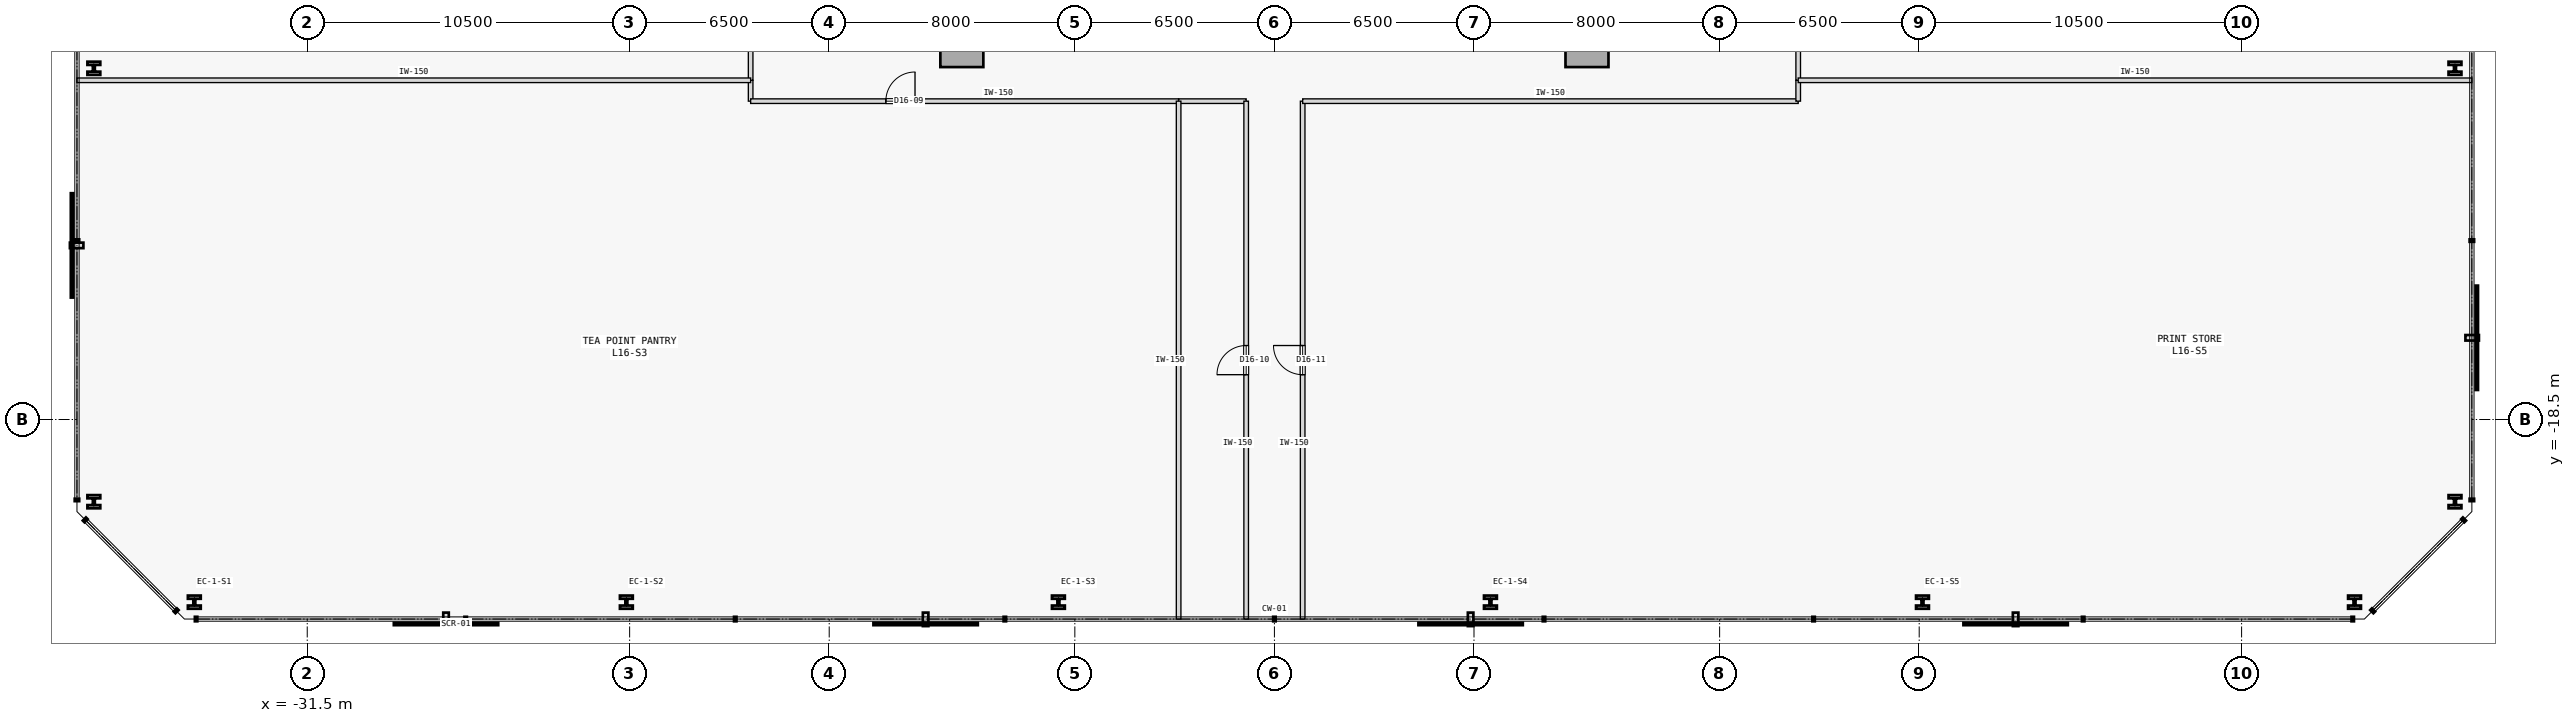
"""IFC4 building model, lengths in metres.
Left out: names, types, materials, properties, quantities, classifications, styles, units other than length and angle.
Written with IfcOpenShell. Run it as: python <this file> out.ifc"""

import sys

from ifc_helpers import new_model, si_unit, direction, frame, frame_2d, origin, origin_2d, place, context, subcontext, project, spatial, rectangle, i_section, extrude, element, fill, save


model = new_model("IFC4")
c1 = context("Model", 3, precision=1e-05, world=origin(), true_north=direction((0.0, 1.0)))
c2 = subcontext(c1, "Body", "Model", "MODEL_VIEW")
j1 = project(units=[si_unit("LENGTHUNIT", "METRE"), si_unit("PLANEANGLEUNIT", "RADIAN")], contexts=[c1])
p1 = place(None, origin())
s1 = spatial("IfcSite", under=j1, at=p1, CompositionType="ELEMENT")
p2 = place(p1, origin())
s2 = spatial("IfcBuilding", under=s1, at=p2, CompositionType="ELEMENT")
p3 = place(p2, frame((0.0, 0.0, 67.4)))
s3 = spatial("IfcBuildingStorey", under=s2, at=p3, CompositionType="ELEMENT", Elevation=67.4)
for number, where, z_axis, x_axis in (
    (1, (-10.18, -6.32, 0.0), (0.0, 0.0, 1.0), (1.0, 0.0, 0.0)),
    (2, (10.18, -6.32, 0.0), (0.0, 0.0, 1.0), (1.0, 0.0, 0.0)),
):
    element("IfcColumn", number, at=place(p3, frame(where, z_axis=z_axis, x_axis=x_axis)), inside=s3, PredefinedType="COLUMN", context=c2, shape_type="SweptSolid", body=[
        extrude(rectangle(XDim=1.4, YDim=1.4, at=origin_2d()), origin(), (0.0, 0.0, 1.0), 3.8),
    ])
for number, where, z_axis, x_axis in (
    (3, (-35.178, -24.45, 0.0), (0.0, 0.0, 1.0), (1.0, 0.0, 0.0)),
    (4, (-21.107, -24.45, 0.0), (0.0, 0.0, 1.0), (1.0, 0.0, 0.0)),
    (5, (-7.036, -24.45, 0.0), (0.0, 0.0, 1.0), (1.0, 0.0, 0.0)),
    (6, (7.036, -24.45, 0.0), (0.0, 0.0, 1.0), (1.0, 0.0, 0.0)),
    (7, (21.107, -24.45, 0.0), (0.0, 0.0, 1.0), (1.0, 0.0, 0.0)),
    (8, (35.178, -24.45, 0.0), (0.0, 0.0, 1.0), (1.0, 0.0, 0.0)),
    (9, (38.45, -21.178, 0.0), (0.0, 0.0, 1.0), (1.0, 0.0, 0.0)),
    (10, (38.45, -7.059, 0.0), (0.0, 0.0, 1.0), (1.0, 0.0, 0.0)),
    (11, (-38.45, -7.059, 0.0), (0.0, 0.0, 1.0), (1.0, 0.0, 0.0)),
    (12, (-38.45, -21.178, 0.0), (0.0, 0.0, 1.0), (1.0, 0.0, 0.0)),
):
    element("IfcColumn", number, at=place(p3, frame(where, z_axis=z_axis, x_axis=x_axis)), inside=s3, PredefinedType="COLUMN", context=c2, shape_type="SweptSolid", body=[
        extrude(i_section(OverallWidth=0.42, OverallDepth=0.431, WebThickness=0.065, FlangeThickness=0.106, FilletRadius=0.015, at=origin_2d()), origin(), (0.0, 0.0, 1.0), 3.8),
    ])
p4 = place(p3, frame((-17.059, -8.13, 0.0), z_axis=(0.0, 0.0, 1.0), x_axis=(0.0, 1.0, 0.0)))
e13 = element("IfcWall", 13, at=p4, inside=s3, PredefinedType="PARTITIONING", context=c2, shape_type="SweptSolid", body=[
    extrude(rectangle(XDim=0.68, YDim=0.15, at=frame_2d((0.34, 0.0))), origin(), (0.0, 0.0, 1.0), 3.575),
])
p5 = place(p3, frame((-17.059, -8.13, 0.0), z_axis=(0.0, 0.0, 1.0), x_axis=(1.0, 0.0, 0.0)))
e14 = element("IfcWall", 14, at=p5, inside=s3, PredefinedType="PARTITIONING", context=c2, shape_type="SweptSolid", body=[
    extrude(rectangle(XDim=13.939, YDim=0.15, at=frame_2d((6.969, 0.0))), origin(), (0.0, 0.0, 1.0), 3.575),
])
p6 = place(p5, frame((4.404, 0.0, 0.0)))
e15 = element("IfcOpeningElement", 15, at=p6, cuts=e14, PredefinedType="OPENING", context=c2, shape_type="SweptSolid", body=[
    extrude(rectangle(XDim=0.95, YDim=2.15, at=frame_2d((0.475, 1.075))), frame((0.0, 0.085, 0.0), z_axis=(0.0, -1.0, 0.0), x_axis=(1.0, 0.0, 0.0)), (0.0, 0.0, 1.0), 0.17),
])
p7 = place(p3, frame((-3.12, -8.13, 0.0), z_axis=(0.0, 0.0, 1.0), x_axis=(1.0, 0.0, 0.0)))
e16 = element("IfcWall", 16, at=p7, inside=s3, PredefinedType="PARTITIONING", context=c2, shape_type="SweptSolid", body=[
    extrude(rectangle(XDim=2.2, YDim=0.15, at=frame_2d((1.1, 0.0))), origin(), (0.0, 0.0, 1.0), 3.575),
])
p8 = place(p3, frame((-0.92, -25.0, 0.0), z_axis=(0.0, 0.0, 1.0), x_axis=(0.0, 1.0, 0.0)))
e17 = element("IfcWall", 17, at=p8, inside=s3, PredefinedType="PARTITIONING", context=c2, shape_type="SweptSolid", body=[
    extrude(rectangle(XDim=16.87, YDim=0.15, at=frame_2d((8.435, 0.0))), origin(), (0.0, 0.0, 1.0), 3.575),
])
p9 = place(p8, frame((7.96, 0.0, 0.0)))
e18 = element("IfcOpeningElement", 18, at=p9, cuts=e17, PredefinedType="OPENING", context=c2, shape_type="SweptSolid", body=[
    extrude(rectangle(XDim=0.95, YDim=2.15, at=frame_2d((0.475, 1.075))), frame((0.0, 0.085, 0.0), z_axis=(0.0, -1.0, 0.0), x_axis=(1.0, 0.0, 0.0)), (0.0, 0.0, 1.0), 0.17),
])
p10 = place(p3, frame((0.92, -25.0, 0.0), z_axis=(0.0, 0.0, 1.0), x_axis=(0.0, 1.0, 0.0)))
e19 = element("IfcWall", 19, at=p10, inside=s3, PredefinedType="PARTITIONING", context=c2, shape_type="SweptSolid", body=[
    extrude(rectangle(XDim=16.87, YDim=0.15, at=frame_2d((8.435, 0.0))), origin(), (0.0, 0.0, 1.0), 3.575),
])
p11 = place(p10, frame((7.96, 0.0, 0.0)))
e20 = element("IfcOpeningElement", 20, at=p11, cuts=e19, PredefinedType="OPENING", context=c2, shape_type="SweptSolid", body=[
    extrude(rectangle(XDim=0.95, YDim=2.15, at=frame_2d((0.475, 1.075))), frame((0.0, 0.085, 0.0), z_axis=(0.0, -1.0, 0.0), x_axis=(1.0, 0.0, 0.0)), (0.0, 0.0, 1.0), 0.17),
])
p12 = place(p3, frame((0.92, -8.13, 0.0), z_axis=(0.0, 0.0, 1.0), x_axis=(1.0, 0.0, 0.0)))
e21 = element("IfcWall", 21, at=p12, inside=s3, PredefinedType="PARTITIONING", context=c2, shape_type="SweptSolid", body=[
    extrude(rectangle(XDim=16.139, YDim=0.15, at=frame_2d((8.07, 0.0))), origin(), (0.0, 0.0, 1.0), 3.575),
])
p13 = place(p3, frame((17.059, -8.13, 0.0), z_axis=(0.0, 0.0, 1.0), x_axis=(0.0, 1.0, 0.0)))
e22 = element("IfcWall", 22, at=p13, inside=s3, PredefinedType="PARTITIONING", context=c2, shape_type="SweptSolid", body=[
    extrude(rectangle(XDim=0.68, YDim=0.15, at=frame_2d((0.34, 0.0))), origin(), (0.0, 0.0, 1.0), 3.575),
])
for number, where, z_axis, x_axis in (
    (23, (-17.059, -7.45, 0.0), (0.0, 0.0, 1.0), (0.0, 1.0, 0.0)),
    (24, (17.059, -7.45, 0.0), (0.0, 0.0, 1.0), (0.0, 1.0, 0.0)),
):
    element("IfcWall", number, at=place(p3, frame(where, z_axis=z_axis, x_axis=x_axis)), inside=s3, PredefinedType="PARTITIONING", context=c2, shape_type="SweptSolid", body=[
        extrude(rectangle(XDim=6.53, YDim=0.15, at=frame_2d((3.265, 0.0))), origin(), (0.0, 0.0, 1.0), 3.575),
    ])
p14 = place(p3, frame((-3.12, -25.0, 0.0), z_axis=(0.0, 0.0, 1.0), x_axis=(0.0, 1.0, 0.0)))
e25 = element("IfcWall", 25, at=p14, inside=s3, PredefinedType="PARTITIONING", context=c2, shape_type="SweptSolid", body=[
    extrude(rectangle(XDim=16.87, YDim=0.15, at=frame_2d((8.435, 0.0))), origin(), (0.0, 0.0, 1.0), 3.575),
])
for number, where, z_axis, x_axis in (
    (26, (-39.0, -7.45, 0.0), (0.0, 0.0, 1.0), (1.0, 0.0, 0.0)),
    (27, (17.059, -7.45, 0.0), (0.0, 0.0, 1.0), (1.0, 0.0, 0.0)),
):
    element("IfcWall", number, at=place(p3, frame(where, z_axis=z_axis, x_axis=x_axis)), inside=s3, PredefinedType="PARTITIONING", context=c2, shape_type="SweptSolid", body=[
        extrude(rectangle(XDim=21.941, YDim=0.15, at=frame_2d((10.97, 0.0))), origin(), (0.0, 0.0, 1.0), 3.575),
    ])
p15 = place(p6, origin())
e28 = element("IfcDoor", 28, at=p15, inside=s3, OperationType="SINGLE_SWING_RIGHT", PredefinedType="DOOR", context=c2, shape_type="SweptSolid", body=[
    extrude(rectangle(XDim=0.95, YDim=2.15, at=frame_2d((0.475, 1.075))), frame((0.0, 0.025, 0.0), z_axis=(0.0, -1.0, 0.0), x_axis=(1.0, 0.0, 0.0)), (0.0, 0.0, 1.0), 0.05),
])
fill(e15, e28)
p16 = place(p9, origin())
e29 = element("IfcDoor", 29, at=p16, inside=s3, OperationType="SINGLE_SWING_LEFT", PredefinedType="DOOR", context=c2, shape_type="SweptSolid", body=[
    extrude(rectangle(XDim=0.95, YDim=2.15, at=frame_2d((0.475, 1.075))), frame((0.0, 0.025, 0.0), z_axis=(0.0, -1.0, 0.0), x_axis=(1.0, 0.0, 0.0)), (0.0, 0.0, 1.0), 0.05),
])
fill(e18, e29)
p17 = place(p11, origin())
e30 = element("IfcDoor", 30, at=p17, inside=s3, OperationType="SINGLE_SWING_RIGHT", PredefinedType="DOOR", context=c2, shape_type="SweptSolid", body=[
    extrude(rectangle(XDim=0.95, YDim=2.15, at=frame_2d((0.475, 1.075))), frame((0.0, 0.025, 0.0), z_axis=(0.0, -1.0, 0.0), x_axis=(1.0, 0.0, 0.0)), (0.0, 0.0, 1.0), 0.05),
])
fill(e20, e30)
save(model, sys.argv[1])
